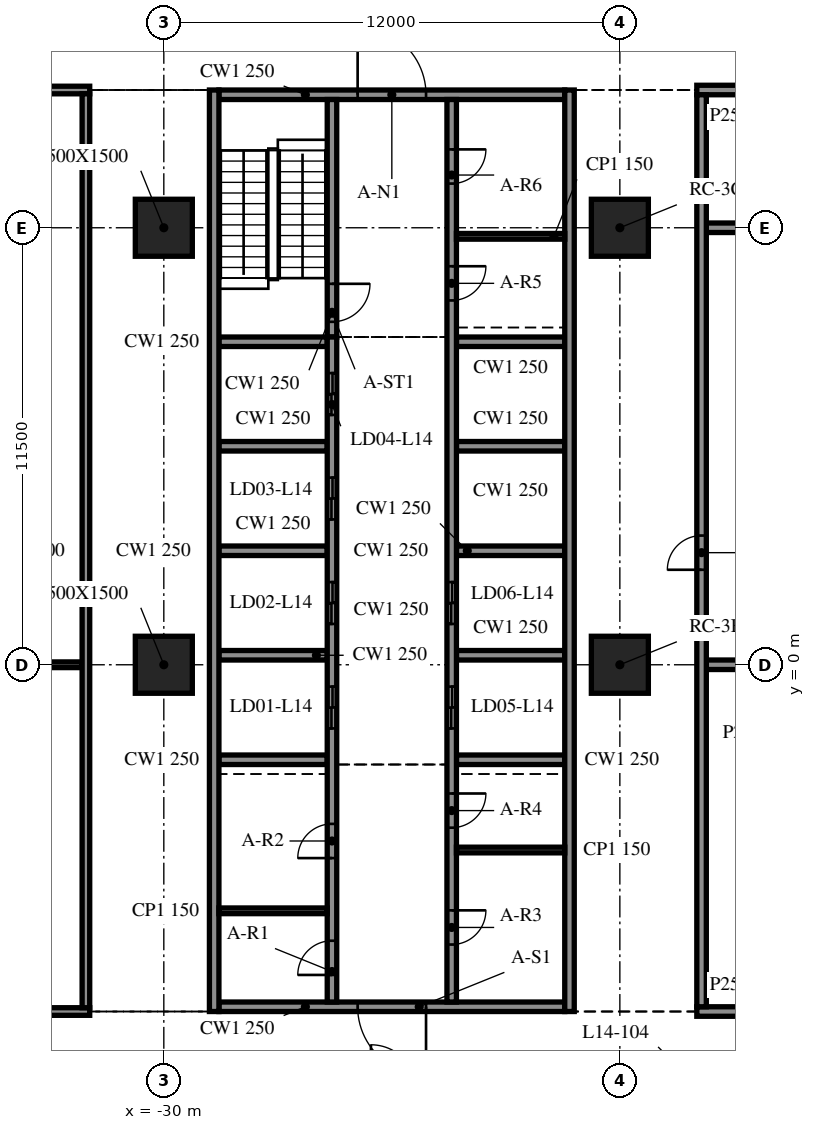
"""IFC4 building model, lengths in metres.
Left out: names, types, materials, properties, quantities, classifications, styles, units other than length and angle.
Written with IfcOpenShell. Run it as: python <this file> out.ifc"""

import sys

from ifc_helpers import new_model, si_unit, direction, frame, frame_2d, origin, origin_2d, place, context, subcontext, project, spatial, rectangle, extrude, element, fill, save


model = new_model("IFC4")
c1 = context("Model", 3, precision=1e-05, world=origin(), true_north=direction((0.0, 1.0)))
c2 = subcontext(c1, "Body", "Model", "MODEL_VIEW")
j1 = project(units=[si_unit("LENGTHUNIT", "METRE"), si_unit("PLANEANGLEUNIT", "RADIAN")], contexts=[c1])
p1 = place(None, origin())
s1 = spatial("IfcSite", under=j1, at=p1, CompositionType="ELEMENT")
p2 = place(p1, origin())
s2 = spatial("IfcBuilding", under=s1, at=p2, CompositionType="ELEMENT")
p3 = place(p2, frame((0.0, 0.0, 63.2)))
s3 = spatial("IfcBuildingStorey", under=s2, at=p3, CompositionType="ELEMENT", Elevation=63.2)
for number, where, z_axis, x_axis in (
    (1, (-30.0, 0.0, -0.34), (0.0, 0.0, 1.0), (1.0, 0.0, 0.0)),
    (2, (-30.0, 11.5, -0.34), (0.0, 0.0, 1.0), (1.0, 0.0, 0.0)),
    (3, (-18.0, 0.0, -0.34), (0.0, 0.0, 1.0), (1.0, 0.0, 0.0)),
    (4, (-18.0, 11.5, -0.34), (0.0, 0.0, 1.0), (1.0, 0.0, 0.0)),
):
    element("IfcColumn", number, at=place(p3, frame(where, z_axis=z_axis, x_axis=x_axis)), inside=s3, PredefinedType="COLUMN", context=c2, shape_type="SweptSolid", body=[
        extrude(rectangle(XDim=1.5, YDim=1.5, at=origin_2d()), origin(), (0.0, 0.0, 1.0), 4.3),
    ])
for number, where, z_axis, x_axis in (
    (5, (-28.675, 15.125, 0.0), (0.0, 0.0, 1.0), (0.0, -1.0, 0.0)),
    (6, (-19.325, -9.125, 0.0), (0.0, 0.0, 1.0), (0.0, 1.0, 0.0)),
):
    element("IfcWall", number, at=place(p3, frame(where, z_axis=z_axis, x_axis=x_axis)), inside=s3, PredefinedType="SOLIDWALL", context=c2, shape_type="SweptSolid", body=[
        extrude(rectangle(XDim=24.25, YDim=0.25, at=frame_2d((12.125, 0.0))), origin(), (0.0, 0.0, 1.0), 3.96),
    ])
p4 = place(p3, frame((-19.45, -9.0, 0.0), z_axis=(0.0, 0.0, 1.0), x_axis=(-1.0, 0.0, 0.0)))
e7 = element("IfcWall", 7, at=p4, inside=s3, PredefinedType="SOLIDWALL", context=c2, shape_type="SweptSolid", body=[
    extrude(rectangle(XDim=9.1, YDim=0.25, at=frame_2d((4.55, 0.0))), origin(), (0.0, 0.0, 1.0), 3.96),
])
p5 = place(p4, frame((3.65, 0.0, 0.0)))
e8 = element("IfcOpeningElement", 8, at=p5, cuts=e7, PredefinedType="OPENING", context=c2, shape_type="SweptSolid", body=[
    extrude(rectangle(XDim=1.8, YDim=2.1, at=frame_2d((0.9, 1.05))), frame((0.0, 0.135, 0.0), z_axis=(0.0, -1.0, 0.0), x_axis=(1.0, 0.0, 0.0)), (0.0, 0.0, 1.0), 0.27),
])
p6 = place(p3, frame((-28.55, 15.0, 0.0), z_axis=(0.0, 0.0, 1.0), x_axis=(1.0, 0.0, 0.0)))
e9 = element("IfcWall", 9, at=p6, inside=s3, PredefinedType="SOLIDWALL", context=c2, shape_type="SweptSolid", body=[
    extrude(rectangle(XDim=9.1, YDim=0.25, at=frame_2d((4.55, 0.0))), origin(), (0.0, 0.0, 1.0), 3.96),
])
p7 = place(p6, frame((3.65, 0.0, 0.0)))
e10 = element("IfcOpeningElement", 10, at=p7, cuts=e9, PredefinedType="OPENING", context=c2, shape_type="SweptSolid", body=[
    extrude(rectangle(XDim=1.8, YDim=2.1, at=frame_2d((0.9, 1.05))), frame((0.0, 0.135, 0.0), z_axis=(0.0, -1.0, 0.0), x_axis=(1.0, 0.0, 0.0)), (0.0, 0.0, 1.0), 0.27),
])
p8 = place(p3, frame((-25.575, -8.875, 0.0), z_axis=(0.0, 0.0, 1.0), x_axis=(0.0, 1.0, 0.0)))
e11 = element("IfcWall", 11, at=p8, inside=s3, PredefinedType="SOLIDWALL", context=c2, shape_type="SweptSolid", body=[
    extrude(rectangle(XDim=17.5, YDim=0.25, at=frame_2d((8.75, 0.0))), origin(), (0.0, 0.0, 1.0), 3.96),
])
p9 = place(p8, frame((7.2, 0.0, 0.0)))
e12 = element("IfcOpeningElement", 12, at=p9, cuts=e11, PredefinedType="OPENING", context=c2, shape_type="SweptSolid", body=[
    extrude(rectangle(XDim=1.1, YDim=2.1, at=frame_2d((0.55, 1.05))), frame((0.0, 0.135, 0.0), z_axis=(0.0, -1.0, 0.0), x_axis=(1.0, 0.0, 0.0)), (0.0, 0.0, 1.0), 0.27),
])
p10 = place(p8, frame((9.95, 0.0, 0.0)))
e13 = element("IfcOpeningElement", 13, at=p10, cuts=e11, PredefinedType="OPENING", context=c2, shape_type="SweptSolid", body=[
    extrude(rectangle(XDim=1.1, YDim=2.1, at=frame_2d((0.55, 1.05))), frame((0.0, 0.135, 0.0), z_axis=(0.0, -1.0, 0.0), x_axis=(1.0, 0.0, 0.0)), (0.0, 0.0, 1.0), 0.27),
])
p11 = place(p8, frame((12.7, 0.0, 0.0)))
e14 = element("IfcOpeningElement", 14, at=p11, cuts=e11, PredefinedType="OPENING", context=c2, shape_type="SweptSolid", body=[
    extrude(rectangle(XDim=1.1, YDim=2.1, at=frame_2d((0.55, 1.05))), frame((0.0, 0.135, 0.0), z_axis=(0.0, -1.0, 0.0), x_axis=(1.0, 0.0, 0.0)), (0.0, 0.0, 1.0), 0.27),
])
p12 = place(p8, frame((15.45, 0.0, 0.0)))
e15 = element("IfcOpeningElement", 15, at=p12, cuts=e11, PredefinedType="OPENING", context=c2, shape_type="SweptSolid", body=[
    extrude(rectangle(XDim=1.1, YDim=2.1, at=frame_2d((0.55, 1.05))), frame((0.0, 0.135, 0.0), z_axis=(0.0, -1.0, 0.0), x_axis=(1.0, 0.0, 0.0)), (0.0, 0.0, 1.0), 0.27),
])
p13 = place(p8, frame((0.712, 0.0, 0.0)))
e16 = element("IfcOpeningElement", 16, at=p13, cuts=e11, PredefinedType="OPENING", context=c2, shape_type="SweptSolid", body=[
    extrude(rectangle(XDim=0.9, YDim=2.1, at=frame_2d((0.45, 1.05))), frame((0.0, 0.135, 0.0), z_axis=(0.0, -1.0, 0.0), x_axis=(1.0, 0.0, 0.0)), (0.0, 0.0, 1.0), 0.27),
])
p14 = place(p8, frame((3.788, 0.0, 0.0)))
e17 = element("IfcOpeningElement", 17, at=p14, cuts=e11, PredefinedType="OPENING", context=c2, shape_type="SweptSolid", body=[
    extrude(rectangle(XDim=0.9, YDim=2.1, at=frame_2d((0.45, 1.05))), frame((0.0, 0.135, 0.0), z_axis=(0.0, -1.0, 0.0), x_axis=(1.0, 0.0, 0.0)), (0.0, 0.0, 1.0), 0.27),
])
p15 = place(p3, frame((-25.575, 14.875, 0.0), z_axis=(0.0, 0.0, 1.0), x_axis=(0.0, -1.0, 0.0)))
e18 = element("IfcWall", 18, at=p15, inside=s3, PredefinedType="SOLIDWALL", context=c2, shape_type="SweptSolid", body=[
    extrude(rectangle(XDim=6.25, YDim=0.25, at=frame_2d((3.125, 0.0))), origin(), (0.0, 0.0, 1.0), 3.96),
])
p16 = place(p15, frame((4.85, 0.0, 0.0)))
e19 = element("IfcOpeningElement", 19, at=p16, cuts=e18, PredefinedType="OPENING", context=c2, shape_type="SweptSolid", body=[
    extrude(rectangle(XDim=1.0, YDim=2.1, at=frame_2d((0.5, 1.05))), frame((0.0, 0.135, 0.0), z_axis=(0.0, -1.0, 0.0), x_axis=(1.0, 0.0, 0.0)), (0.0, 0.0, 1.0), 0.27),
])
p17 = place(p3, frame((-22.425, 14.875, 0.0), z_axis=(0.0, 0.0, 1.0), x_axis=(0.0, -1.0, 0.0)))
e20 = element("IfcWall", 20, at=p17, inside=s3, PredefinedType="SOLIDWALL", context=c2, shape_type="SweptSolid", body=[
    extrude(rectangle(XDim=23.75, YDim=0.25, at=frame_2d((11.875, 0.0))), origin(), (0.0, 0.0, 1.0), 3.96),
])
p18 = place(p17, frame((15.45, 0.0, 0.0)))
e21 = element("IfcOpeningElement", 21, at=p18, cuts=e20, PredefinedType="OPENING", context=c2, shape_type="SweptSolid", body=[
    extrude(rectangle(XDim=1.1, YDim=2.1, at=frame_2d((0.55, 1.05))), frame((0.0, 0.135, 0.0), z_axis=(0.0, -1.0, 0.0), x_axis=(1.0, 0.0, 0.0)), (0.0, 0.0, 1.0), 0.27),
])
p19 = place(p17, frame((12.7, 0.0, 0.0)))
e22 = element("IfcOpeningElement", 22, at=p19, cuts=e20, PredefinedType="OPENING", context=c2, shape_type="SweptSolid", body=[
    extrude(rectangle(XDim=1.1, YDim=2.1, at=frame_2d((0.55, 1.05))), frame((0.0, 0.135, 0.0), z_axis=(0.0, -1.0, 0.0), x_axis=(1.0, 0.0, 0.0)), (0.0, 0.0, 1.0), 0.27),
])
p20 = place(p17, frame((21.337, 0.0, 0.0)))
e23 = element("IfcOpeningElement", 23, at=p20, cuts=e20, PredefinedType="OPENING", context=c2, shape_type="SweptSolid", body=[
    extrude(rectangle(XDim=0.9, YDim=2.1, at=frame_2d((0.45, 1.05))), frame((0.0, 0.135, 0.0), z_axis=(0.0, -1.0, 0.0), x_axis=(1.0, 0.0, 0.0)), (0.0, 0.0, 1.0), 0.27),
])
p21 = place(p17, frame((18.262, 0.0, 0.0)))
e24 = element("IfcOpeningElement", 24, at=p21, cuts=e20, PredefinedType="OPENING", context=c2, shape_type="SweptSolid", body=[
    extrude(rectangle(XDim=0.9, YDim=2.1, at=frame_2d((0.45, 1.05))), frame((0.0, 0.135, 0.0), z_axis=(0.0, -1.0, 0.0), x_axis=(1.0, 0.0, 0.0)), (0.0, 0.0, 1.0), 0.27),
])
p22 = place(p17, frame((4.387, 0.0, 0.0)))
e25 = element("IfcOpeningElement", 25, at=p22, cuts=e20, PredefinedType="OPENING", context=c2, shape_type="SweptSolid", body=[
    extrude(rectangle(XDim=0.9, YDim=2.1, at=frame_2d((0.45, 1.05))), frame((0.0, 0.135, 0.0), z_axis=(0.0, -1.0, 0.0), x_axis=(1.0, 0.0, 0.0)), (0.0, 0.0, 1.0), 0.27),
])
p23 = place(p17, frame((1.312, 0.0, 0.0)))
e26 = element("IfcOpeningElement", 26, at=p23, cuts=e20, PredefinedType="OPENING", context=c2, shape_type="SweptSolid", body=[
    extrude(rectangle(XDim=0.9, YDim=2.1, at=frame_2d((0.45, 1.05))), frame((0.0, 0.135, 0.0), z_axis=(0.0, -1.0, 0.0), x_axis=(1.0, 0.0, 0.0)), (0.0, 0.0, 1.0), 0.27),
])
for number, where, z_axis, x_axis in (
    (27, (-28.55, -2.5, 0.0), (0.0, 0.0, 1.0), (1.0, 0.0, 0.0)),
    (28, (-28.55, 0.25, 0.0), (0.0, 0.0, 1.0), (1.0, 0.0, 0.0)),
    (29, (-28.55, 3.0, 0.0), (0.0, 0.0, 1.0), (1.0, 0.0, 0.0)),
    (30, (-28.55, 5.75, 0.0), (0.0, 0.0, 1.0), (1.0, 0.0, 0.0)),
    (31, (-28.55, 8.5, 0.0), (0.0, 0.0, 1.0), (1.0, 0.0, 0.0)),
    (32, (-22.3, -2.5, 0.0), (0.0, 0.0, 1.0), (1.0, 0.0, 0.0)),
    (33, (-22.3, 0.25, 0.0), (0.0, 0.0, 1.0), (1.0, 0.0, 0.0)),
    (34, (-22.3, 3.0, 0.0), (0.0, 0.0, 1.0), (1.0, 0.0, 0.0)),
    (35, (-22.3, 5.75, 0.0), (0.0, 0.0, 1.0), (1.0, 0.0, 0.0)),
    (36, (-22.3, 8.5, 0.0), (0.0, 0.0, 1.0), (1.0, 0.0, 0.0)),
):
    element("IfcWall", number, at=place(p3, frame(where, z_axis=z_axis, x_axis=x_axis)), inside=s3, PredefinedType="SOLIDWALL", context=c2, shape_type="SweptSolid", body=[
        extrude(rectangle(XDim=2.85, YDim=0.25, at=frame_2d((1.425, 0.0))), origin(), (0.0, 0.0, 1.0), 3.96),
    ])
for number, where, z_axis, x_axis in (
    (37, (-28.55, -6.475, 0.0), (0.0, 0.0, 1.0), (1.0, 0.0, 0.0)),
    (38, (-22.3, -4.875, 0.0), (0.0, 0.0, 1.0), (1.0, 0.0, 0.0)),
    (39, (-22.3, 11.275, 0.0), (0.0, 0.0, 1.0), (1.0, 0.0, 0.0)),
):
    element("IfcWall", number, at=place(p3, frame(where, z_axis=z_axis, x_axis=x_axis)), inside=s3, PredefinedType="PARTITIONING", context=c2, shape_type="SweptSolid", body=[
        extrude(rectangle(XDim=2.85, YDim=0.15, at=frame_2d((1.425, 0.0))), origin(), (0.0, 0.0, 1.0), 3.96),
    ])
p24 = place(p3, frame((-41.975, -9.125, 0.0), z_axis=(0.0, 0.0, 1.0), x_axis=(1.0, 0.0, 0.0)))
e40 = element("IfcWall", 40, at=p24, inside=s3, PredefinedType="PARTITIONING", context=c2, shape_type="SweptSolid", body=[
    extrude(rectangle(XDim=10.025, YDim=0.2, at=frame_2d((5.013, 0.0))), origin(), (0.0, 0.0, 1.0), 3.96),
])
p25 = place(p24, frame((4.3, 0.0, 0.0)))
e41 = element("IfcOpeningElement", 41, at=p25, cuts=e40, PredefinedType="OPENING", context=c2, shape_type="SweptSolid", body=[
    extrude(rectangle(XDim=1.2, YDim=2.1, at=frame_2d((0.6, 1.05))), frame((0.0, 0.11, 0.0), z_axis=(0.0, -1.0, 0.0), x_axis=(1.0, 0.0, 0.0)), (0.0, 0.0, 1.0), 0.22),
])
p26 = place(p3, frame((-15.975, -9.125, 0.0), z_axis=(0.0, 0.0, 1.0), x_axis=(1.0, 0.0, 0.0)))
e42 = element("IfcWall", 42, at=p26, inside=s3, PredefinedType="PARTITIONING", context=c2, shape_type="SweptSolid", body=[
    extrude(rectangle(XDim=7.85, YDim=0.25, at=frame_2d((3.925, 0.0))), origin(), (0.0, 0.0, 1.0), 3.96),
])
p27 = place(p26, frame((3.5, 0.0, 0.0)))
e43 = element("IfcOpeningElement", 43, at=p27, cuts=e42, PredefinedType="OPENING", context=c2, shape_type="SweptSolid", body=[
    extrude(rectangle(XDim=0.9, YDim=2.1, at=frame_2d((0.45, 1.05))), frame((0.0, 0.135, 0.0), z_axis=(0.0, -1.0, 0.0), x_axis=(1.0, 0.0, 0.0)), (0.0, 0.0, 1.0), 0.27),
])
p28 = place(p3, frame((-41.25, 0.0, 0.0), z_axis=(0.0, 0.0, 1.0), x_axis=(1.0, 0.0, 0.0)))
e44 = element("IfcWall", 44, at=p28, inside=s3, PredefinedType="PARTITIONING", context=c2, shape_type="SweptSolid", body=[
    extrude(rectangle(XDim=9.1, YDim=0.15, at=frame_2d((4.55, 0.0))), origin(), (0.0, 0.0, 1.0), 3.96),
])
for number, where, z_axis, x_axis in (
    (45, (-15.725, 0.0, 0.0), (0.0, 0.0, 1.0), (1.0, 0.0, 0.0)),
    (46, (-15.725, 11.5, 0.0), (0.0, 0.0, 1.0), (1.0, 0.0, 0.0)),
):
    element("IfcWall", number, at=place(p3, frame(where, z_axis=z_axis, x_axis=x_axis)), inside=s3, PredefinedType="PARTITIONING", context=c2, shape_type="SweptSolid", body=[
        extrude(rectangle(XDim=7.35, YDim=0.25, at=frame_2d((3.675, 0.0))), origin(), (0.0, 0.0, 1.0), 3.96),
    ])
p29 = place(p3, frame((-41.975, 15.125, 0.0), z_axis=(0.0, 0.0, 1.0), x_axis=(1.0, 0.0, 0.0)))
e47 = element("IfcWall", 47, at=p29, inside=s3, PredefinedType="PARTITIONING", context=c2, shape_type="SweptSolid", body=[
    extrude(rectangle(XDim=10.025, YDim=0.2, at=frame_2d((5.013, 0.0))), origin(), (0.0, 0.0, 1.0), 3.96),
])
p30 = place(p29, frame((4.3, 0.0, 0.0)))
e48 = element("IfcOpeningElement", 48, at=p30, cuts=e47, PredefinedType="OPENING", context=c2, shape_type="SweptSolid", body=[
    extrude(rectangle(XDim=1.2, YDim=2.1, at=frame_2d((0.6, 1.05))), frame((0.0, 0.11, 0.0), z_axis=(0.0, -1.0, 0.0), x_axis=(1.0, 0.0, 0.0)), (0.0, 0.0, 1.0), 0.22),
])
p31 = place(p3, frame((-15.975, 15.125, 0.0), z_axis=(0.0, 0.0, 1.0), x_axis=(1.0, 0.0, 0.0)))
e49 = element("IfcWall", 49, at=p31, inside=s3, PredefinedType="PARTITIONING", context=c2, shape_type="SweptSolid", body=[
    extrude(rectangle(XDim=7.85, YDim=0.25, at=frame_2d((3.925, 0.0))), origin(), (0.0, 0.0, 1.0), 3.96),
])
p32 = place(p31, frame((3.5, 0.0, 0.0)))
e50 = element("IfcOpeningElement", 50, at=p32, cuts=e49, PredefinedType="OPENING", context=c2, shape_type="SweptSolid", body=[
    extrude(rectangle(XDim=0.9, YDim=2.1, at=frame_2d((0.45, 1.05))), frame((0.0, 0.135, 0.0), z_axis=(0.0, -1.0, 0.0), x_axis=(1.0, 0.0, 0.0)), (0.0, 0.0, 1.0), 0.27),
])
p33 = place(p3, frame((-32.05, -9.025, 0.0), z_axis=(0.0, 0.0, 1.0), x_axis=(0.0, 1.0, 0.0)))
e51 = element("IfcWall", 51, at=p33, inside=s3, PredefinedType="PARTITIONING", context=c2, shape_type="SweptSolid", body=[
    extrude(rectangle(XDim=24.05, YDim=0.2, at=frame_2d((12.025, 0.0))), origin(), (0.0, 0.0, 1.0), 3.96),
])
p34 = place(p3, frame((-15.85, -9.0, 0.0), z_axis=(0.0, 0.0, 1.0), x_axis=(0.0, 1.0, 0.0)))
e52 = element("IfcWall", 52, at=p34, inside=s3, PredefinedType="PARTITIONING", context=c2, shape_type="SweptSolid", body=[
    extrude(rectangle(XDim=24.0, YDim=0.25, at=frame_2d((12.0, 0.0))), origin(), (0.0, 0.0, 1.0), 3.96),
])
p35 = place(p34, frame((11.5, 0.0, 0.0)))
e53 = element("IfcOpeningElement", 53, at=p35, cuts=e52, PredefinedType="OPENING", context=c2, shape_type="SweptSolid", body=[
    extrude(rectangle(XDim=0.9, YDim=2.1, at=frame_2d((0.45, 1.05))), frame((0.0, 0.135, 0.0), z_axis=(0.0, -1.0, 0.0), x_axis=(1.0, 0.0, 0.0)), (0.0, 0.0, 1.0), 0.27),
])
p36 = place(p5, origin())
e54 = element("IfcDoor", 54, at=p36, inside=s3, OperationType="DOUBLE_DOOR_SINGLE_SWING", PredefinedType="DOOR", context=c2, shape_type="SweptSolid", body=[
    extrude(rectangle(XDim=1.8, YDim=2.1, at=frame_2d((0.9, 1.05))), frame((0.0, 0.025, 0.0), z_axis=(0.0, -1.0, 0.0), x_axis=(1.0, 0.0, 0.0)), (0.0, 0.0, 1.0), 0.05),
])
fill(e8, e54)
p37 = place(p7, origin())
e55 = element("IfcDoor", 55, at=p37, inside=s3, OperationType="DOUBLE_DOOR_SINGLE_SWING", PredefinedType="DOOR", context=c2, shape_type="SweptSolid", body=[
    extrude(rectangle(XDim=1.8, YDim=2.1, at=frame_2d((0.9, 1.05))), frame((0.0, 0.025, 0.0), z_axis=(0.0, -1.0, 0.0), x_axis=(1.0, 0.0, 0.0)), (0.0, 0.0, 1.0), 0.05),
])
fill(e10, e55)
p38 = place(p18, origin())
e56 = element("IfcDoor", 56, at=p38, inside=s3, OperationType="DOUBLE_DOOR_SLIDING", PredefinedType="DOOR", context=c2, shape_type="SweptSolid", body=[
    extrude(rectangle(XDim=1.1, YDim=2.1, at=frame_2d((0.55, 1.05))), frame((0.0, 0.025, 0.0), z_axis=(0.0, -1.0, 0.0), x_axis=(1.0, 0.0, 0.0)), (0.0, 0.0, 1.0), 0.05),
])
fill(e21, e56)
p39 = place(p19, origin())
e57 = element("IfcDoor", 57, at=p39, inside=s3, OperationType="DOUBLE_DOOR_SLIDING", PredefinedType="DOOR", context=c2, shape_type="SweptSolid", body=[
    extrude(rectangle(XDim=1.1, YDim=2.1, at=frame_2d((0.55, 1.05))), frame((0.0, 0.025, 0.0), z_axis=(0.0, -1.0, 0.0), x_axis=(1.0, 0.0, 0.0)), (0.0, 0.0, 1.0), 0.05),
])
fill(e22, e57)
p40 = place(p9, origin())
e58 = element("IfcDoor", 58, at=p40, inside=s3, OperationType="DOUBLE_DOOR_SLIDING", PredefinedType="DOOR", context=c2, shape_type="SweptSolid", body=[
    extrude(rectangle(XDim=1.1, YDim=2.1, at=frame_2d((0.55, 1.05))), frame((0.0, 0.025, 0.0), z_axis=(0.0, -1.0, 0.0), x_axis=(1.0, 0.0, 0.0)), (0.0, 0.0, 1.0), 0.05),
])
fill(e12, e58)
p41 = place(p10, origin())
e59 = element("IfcDoor", 59, at=p41, inside=s3, OperationType="DOUBLE_DOOR_SLIDING", PredefinedType="DOOR", context=c2, shape_type="SweptSolid", body=[
    extrude(rectangle(XDim=1.1, YDim=2.1, at=frame_2d((0.55, 1.05))), frame((0.0, 0.025, 0.0), z_axis=(0.0, -1.0, 0.0), x_axis=(1.0, 0.0, 0.0)), (0.0, 0.0, 1.0), 0.05),
])
fill(e13, e59)
p42 = place(p11, origin())
e60 = element("IfcDoor", 60, at=p42, inside=s3, OperationType="DOUBLE_DOOR_SLIDING", PredefinedType="DOOR", context=c2, shape_type="SweptSolid", body=[
    extrude(rectangle(XDim=1.1, YDim=2.1, at=frame_2d((0.55, 1.05))), frame((0.0, 0.025, 0.0), z_axis=(0.0, -1.0, 0.0), x_axis=(1.0, 0.0, 0.0)), (0.0, 0.0, 1.0), 0.05),
])
fill(e14, e60)
p43 = place(p12, origin())
e61 = element("IfcDoor", 61, at=p43, inside=s3, OperationType="DOUBLE_DOOR_SLIDING", PredefinedType="DOOR", context=c2, shape_type="SweptSolid", body=[
    extrude(rectangle(XDim=1.1, YDim=2.1, at=frame_2d((0.55, 1.05))), frame((0.0, 0.025, 0.0), z_axis=(0.0, -1.0, 0.0), x_axis=(1.0, 0.0, 0.0)), (0.0, 0.0, 1.0), 0.05),
])
fill(e15, e61)
p44 = place(p13, origin())
e62 = element("IfcDoor", 62, at=p44, inside=s3, OperationType="SINGLE_SWING_LEFT", PredefinedType="DOOR", context=c2, shape_type="SweptSolid", body=[
    extrude(rectangle(XDim=0.9, YDim=2.1, at=frame_2d((0.45, 1.05))), frame((0.0, 0.025, 0.0), z_axis=(0.0, -1.0, 0.0), x_axis=(1.0, 0.0, 0.0)), (0.0, 0.0, 1.0), 0.05),
])
fill(e16, e62)
p45 = place(p14, origin())
e63 = element("IfcDoor", 63, at=p45, inside=s3, OperationType="SINGLE_SWING_RIGHT", PredefinedType="DOOR", context=c2, shape_type="SweptSolid", body=[
    extrude(rectangle(XDim=0.9, YDim=2.1, at=frame_2d((0.45, 1.05))), frame((0.0, 0.025, 0.0), z_axis=(0.0, -1.0, 0.0), x_axis=(1.0, 0.0, 0.0)), (0.0, 0.0, 1.0), 0.05),
])
fill(e17, e63)
p46 = place(p20, origin())
e64 = element("IfcDoor", 64, at=p46, inside=s3, OperationType="SINGLE_SWING_LEFT", PredefinedType="DOOR", context=c2, shape_type="SweptSolid", body=[
    extrude(rectangle(XDim=0.9, YDim=2.1, at=frame_2d((0.45, 1.05))), frame((0.0, 0.025, 0.0), z_axis=(0.0, -1.0, 0.0), x_axis=(1.0, 0.0, 0.0)), (0.0, 0.0, 1.0), 0.05),
])
fill(e23, e64)
p47 = place(p21, origin())
e65 = element("IfcDoor", 65, at=p47, inside=s3, OperationType="SINGLE_SWING_RIGHT", PredefinedType="DOOR", context=c2, shape_type="SweptSolid", body=[
    extrude(rectangle(XDim=0.9, YDim=2.1, at=frame_2d((0.45, 1.05))), frame((0.0, 0.025, 0.0), z_axis=(0.0, -1.0, 0.0), x_axis=(1.0, 0.0, 0.0)), (0.0, 0.0, 1.0), 0.05),
])
fill(e24, e65)
p48 = place(p22, origin())
e66 = element("IfcDoor", 66, at=p48, inside=s3, OperationType="SINGLE_SWING_LEFT", PredefinedType="DOOR", context=c2, shape_type="SweptSolid", body=[
    extrude(rectangle(XDim=0.9, YDim=2.1, at=frame_2d((0.45, 1.05))), frame((0.0, 0.025, 0.0), z_axis=(0.0, -1.0, 0.0), x_axis=(1.0, 0.0, 0.0)), (0.0, 0.0, 1.0), 0.05),
])
fill(e25, e66)
p49 = place(p23, origin())
e67 = element("IfcDoor", 67, at=p49, inside=s3, OperationType="SINGLE_SWING_RIGHT", PredefinedType="DOOR", context=c2, shape_type="SweptSolid", body=[
    extrude(rectangle(XDim=0.9, YDim=2.1, at=frame_2d((0.45, 1.05))), frame((0.0, 0.025, 0.0), z_axis=(0.0, -1.0, 0.0), x_axis=(1.0, 0.0, 0.0)), (0.0, 0.0, 1.0), 0.05),
])
fill(e26, e67)
p50 = place(p16, origin())
e68 = element("IfcDoor", 68, at=p50, inside=s3, OperationType="SINGLE_SWING_LEFT", PredefinedType="DOOR", context=c2, shape_type="SweptSolid", body=[
    extrude(rectangle(XDim=1.0, YDim=2.1, at=frame_2d((0.5, 1.05))), frame((0.0, 0.025, 0.0), z_axis=(0.0, -1.0, 0.0), x_axis=(1.0, 0.0, 0.0)), (0.0, 0.0, 1.0), 0.05),
])
fill(e19, e68)
p51 = place(p35, origin())
e69 = element("IfcDoor", 69, at=p51, inside=s3, OperationType="SINGLE_SWING_RIGHT", PredefinedType="DOOR", context=c2, shape_type="SweptSolid", body=[
    extrude(rectangle(XDim=0.9, YDim=2.1, at=frame_2d((0.45, 1.05))), frame((0.0, 0.025, 0.0), z_axis=(0.0, -1.0, 0.0), x_axis=(1.0, 0.0, 0.0)), (0.0, 0.0, 1.0), 0.05),
])
fill(e53, e69)
save(model, sys.argv[1])
